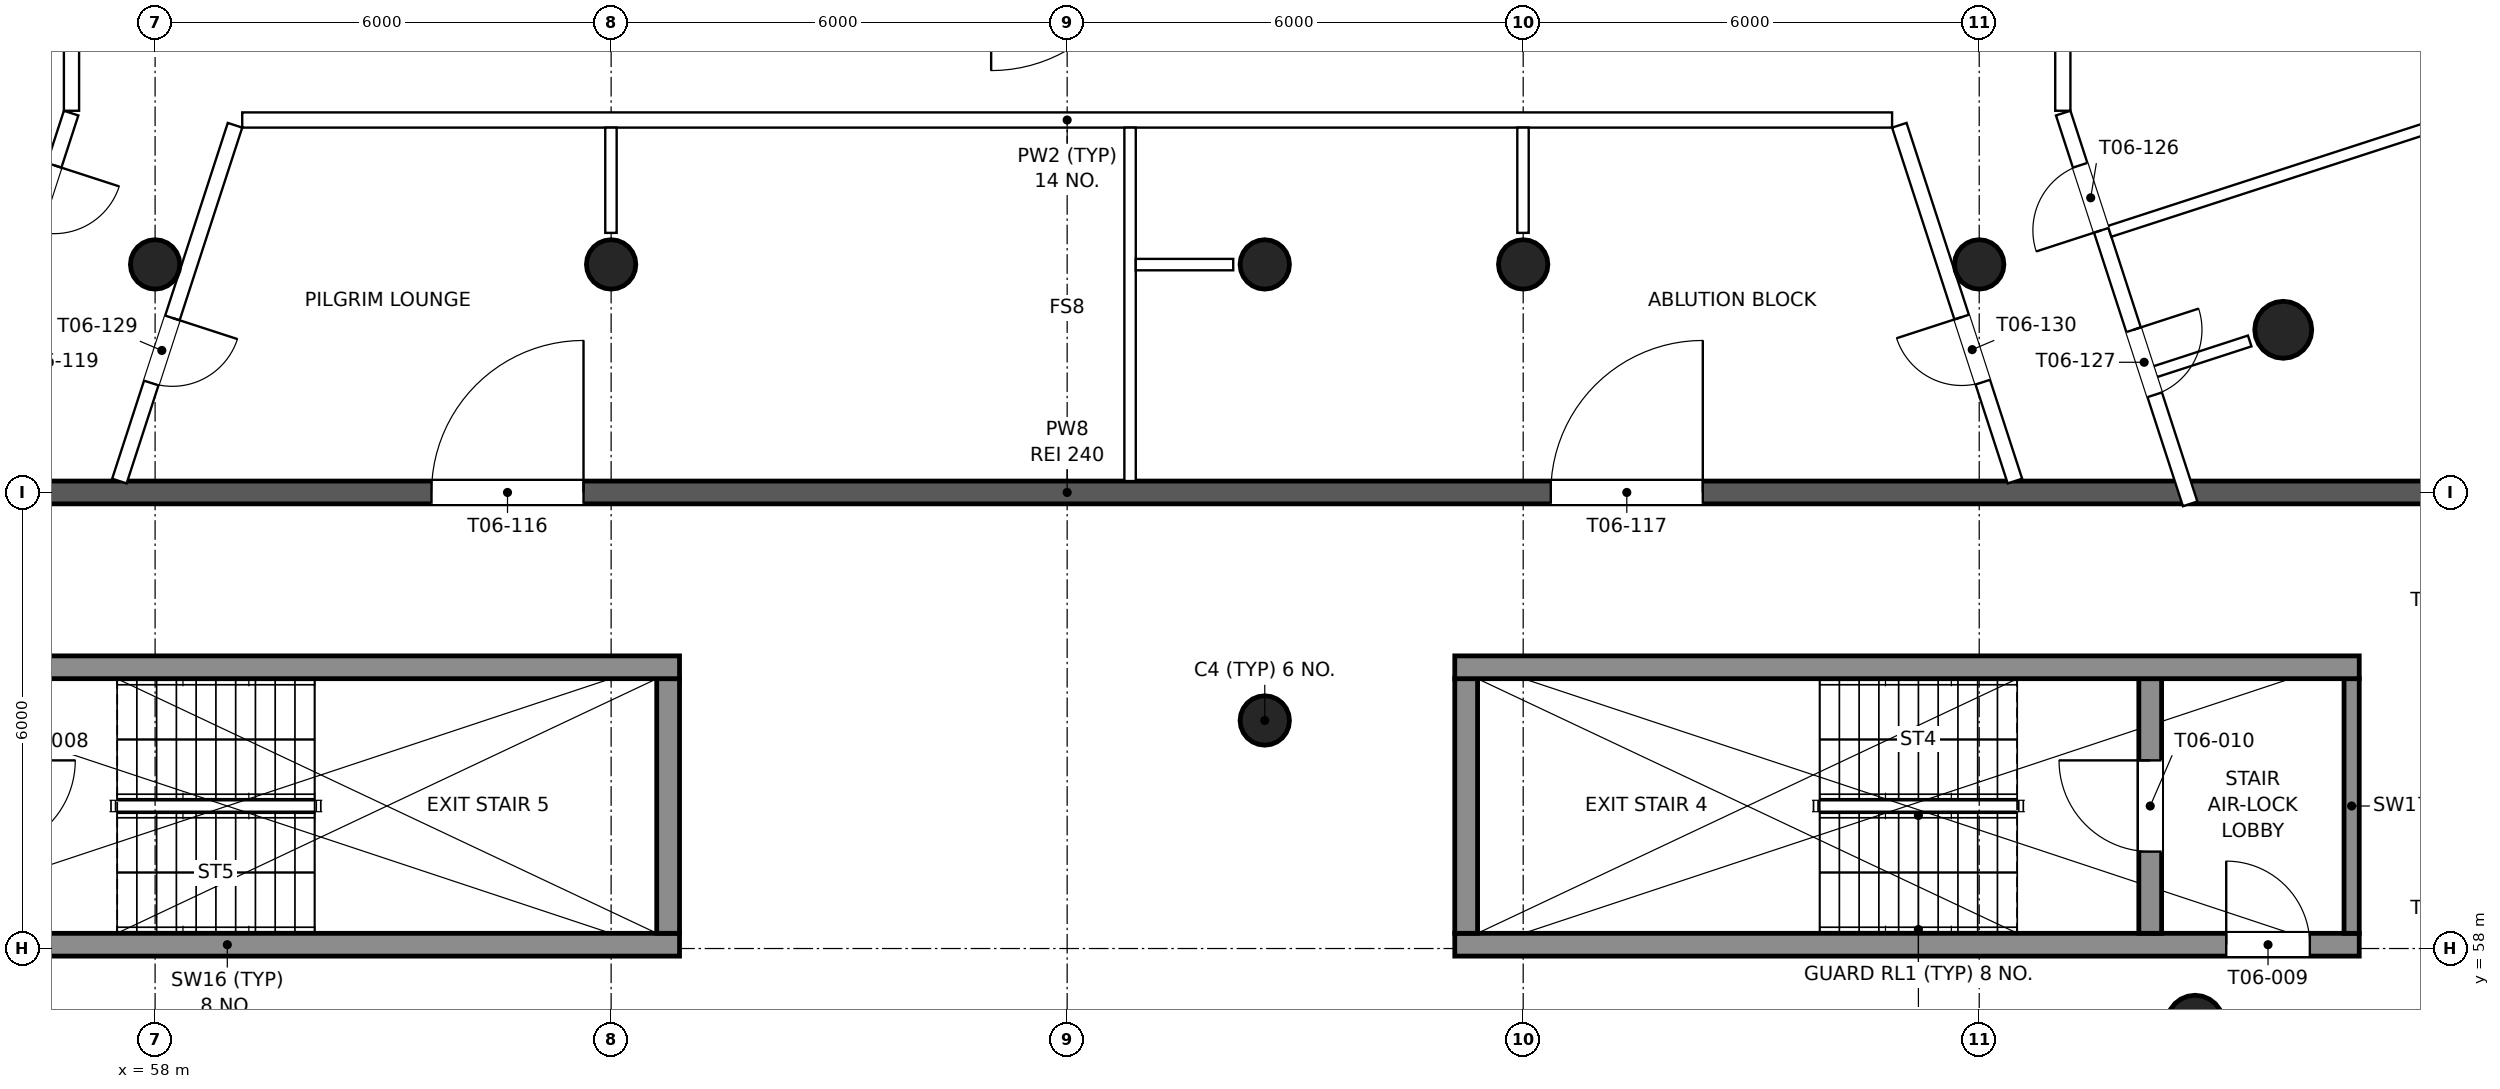
"""IFC4 building model, lengths in metres.
Left out: names, types, materials, properties, quantities, classifications, styles, units other than length and angle.
Written with IfcOpenShell. Run it as: python <this file> out.ifc"""

import sys

from ifc_helpers import new_model, si_unit, direction, frame, frame_2d, origin, origin_2d, place, context, subcontext, project, spatial, rectangle, circle, extrude, element, fill, save


model = new_model("IFC4")
c1 = context("Model", 3, precision=1e-05, world=origin(), true_north=direction((0.0, 1.0)))
c2 = subcontext(c1, "Body", "Model", "MODEL_VIEW")
j1 = project(units=[si_unit("LENGTHUNIT", "METRE"), si_unit("PLANEANGLEUNIT", "RADIAN")], contexts=[c1])
p1 = place(None, origin())
s1 = spatial("IfcSite", under=j1, at=p1, CompositionType="ELEMENT")
p2 = place(p1, origin())
s2 = spatial("IfcBuilding", under=s1, at=p2, CompositionType="ELEMENT")
p3 = place(p2, frame((0.0, 0.0, 98.6)))
s3 = spatial("IfcBuildingStorey", under=s2, at=p3, CompositionType="ELEMENT", Elevation=98.6)
for number, where, z_axis, x_axis in (
    (1, (84.84, 57.01, 0.0), (0.0, 0.0, 1.0), (1.0, 0.0, 0.0)),
    (2, (86.0, 66.14, 0.0), (0.0, 0.0, 1.0), (1.0, 0.0, 0.0)),
):
    element("IfcColumn", number, at=place(p3, frame(where, z_axis=z_axis, x_axis=x_axis)), inside=s3, PredefinedType="COLUMN", context=c2, shape_type="SweptSolid", body=[
        extrude(circle(Radius=0.375, at=origin_2d()), origin(), (0.0, 0.0, 1.0), 3.9),
    ])
for number, where, z_axis, x_axis in (
    (3, (58.0, 67.0, 0.0), (0.0, 0.0, 1.0), (1.0, 0.0, 0.0)),
    (4, (64.0, 67.0, 0.0), (0.0, 0.0, 1.0), (1.0, 0.0, 0.0)),
    (5, (72.6, 61.0, 0.0), (0.0, 0.0, 1.0), (1.0, 0.0, 0.0)),
    (6, (72.6, 67.0, 0.0), (0.0, 0.0, 1.0), (1.0, 0.0, 0.0)),
    (7, (76.0, 67.0, 0.0), (0.0, 0.0, 1.0), (1.0, 0.0, 0.0)),
    (8, (82.0, 67.0, 0.0), (0.0, 0.0, 1.0), (1.0, 0.0, 0.0)),
):
    element("IfcColumn", number, at=place(p3, frame(where, z_axis=z_axis, x_axis=x_axis)), inside=s3, PredefinedType="COLUMN", context=c2, shape_type="SweptSolid", body=[
        extrude(circle(Radius=0.325, at=origin_2d()), origin(), (0.0, 0.0, 1.0), 3.9),
    ])
p4 = place(p3, frame((53.0, 58.05, 0.0), z_axis=(0.0, 0.0, 1.0), x_axis=(1.0, 0.0, 0.0)))
e9 = element("IfcWall", 9, at=p4, inside=s3, PredefinedType="SHEAR", context=c2, shape_type="SweptSolid", body=[
    extrude(rectangle(XDim=11.9, YDim=0.3, at=frame_2d((5.95, 0.0))), origin(), (0.0, 0.0, 1.0), 3.9),
])
p5 = place(p4, frame((0.65, 0.0, 0.0)))
e10 = element("IfcOpeningElement", 10, at=p5, cuts=e9, PredefinedType="OPENING", context=c2, shape_type="SweptSolid", body=[
    extrude(rectangle(XDim=1.1, YDim=2.1, at=frame_2d((0.55, 1.05))), frame((0.0, 0.16, 0.0), z_axis=(0.0, -1.0, 0.0), x_axis=(1.0, 0.0, 0.0)), (0.0, 0.0, 1.0), 0.32),
])
p6 = place(p3, frame((75.1, 58.05, 0.0), z_axis=(0.0, 0.0, 1.0), x_axis=(1.0, 0.0, 0.0)))
e11 = element("IfcWall", 11, at=p6, inside=s3, PredefinedType="SHEAR", context=c2, shape_type="SweptSolid", body=[
    extrude(rectangle(XDim=11.9, YDim=0.3, at=frame_2d((5.95, 0.0))), origin(), (0.0, 0.0, 1.0), 3.9),
])
p7 = place(p6, frame((10.15, 0.0, 0.0)))
e12 = element("IfcOpeningElement", 12, at=p7, cuts=e11, PredefinedType="OPENING", context=c2, shape_type="SweptSolid", body=[
    extrude(rectangle(XDim=1.1, YDim=2.1, at=frame_2d((0.55, 1.05))), frame((0.0, 0.16, 0.0), z_axis=(0.0, -1.0, 0.0), x_axis=(1.0, 0.0, 0.0)), (0.0, 0.0, 1.0), 0.32),
])
for number, where, z_axis, x_axis in (
    (13, (64.75, 58.2, 0.0), (0.0, 0.0, 1.0), (0.0, 1.0, 0.0)),
    (14, (75.25, 58.2, 0.0), (0.0, 0.0, 1.0), (0.0, 1.0, 0.0)),
):
    element("IfcWall", number, at=place(p3, frame(where, z_axis=z_axis, x_axis=x_axis)), inside=s3, PredefinedType="SHEAR", context=c2, shape_type="SweptSolid", body=[
        extrude(rectangle(XDim=3.35, YDim=0.3, at=frame_2d((1.675, 0.0))), origin(), (0.0, 0.0, 1.0), 3.9),
    ])
p8 = place(p3, frame((84.25, 58.2, 0.0), z_axis=(0.0, 0.0, 1.0), x_axis=(0.0, 1.0, 0.0)))
e15 = element("IfcWall", 15, at=p8, inside=s3, PredefinedType="SHEAR", context=c2, shape_type="SweptSolid", body=[
    extrude(rectangle(XDim=3.35, YDim=0.3, at=frame_2d((1.675, 0.0))), origin(), (0.0, 0.0, 1.0), 3.9),
])
p9 = place(p8, frame((1.075, 0.0, 0.0)))
e16 = element("IfcOpeningElement", 16, at=p9, cuts=e15, PredefinedType="OPENING", context=c2, shape_type="SweptSolid", body=[
    extrude(rectangle(XDim=1.2, YDim=2.1, at=frame_2d((0.6, 1.05))), frame((0.0, 0.16, 0.0), z_axis=(0.0, -1.0, 0.0), x_axis=(1.0, 0.0, 0.0)), (0.0, 0.0, 1.0), 0.32),
])
p10 = place(p3, frame((86.9, 58.2, 0.0), z_axis=(0.0, 0.0, 1.0), x_axis=(0.0, 1.0, 0.0)))
e17 = element("IfcWall", 17, at=p10, inside=s3, PredefinedType="SHEAR", context=c2, shape_type="SweptSolid", body=[
    extrude(rectangle(XDim=3.35, YDim=0.2, at=frame_2d((1.675, 0.0))), origin(), (0.0, 0.0, 1.0), 3.9),
])
for number, where, z_axis, x_axis in (
    (18, (53.0, 61.7, 0.0), (0.0, 0.0, 1.0), (1.0, 0.0, 0.0)),
    (19, (75.1, 61.7, 0.0), (0.0, 0.0, 1.0), (1.0, 0.0, 0.0)),
):
    element("IfcWall", number, at=place(p3, frame(where, z_axis=z_axis, x_axis=x_axis)), inside=s3, PredefinedType="SHEAR", context=c2, shape_type="SweptSolid", body=[
        extrude(rectangle(XDim=11.9, YDim=0.3, at=frame_2d((5.95, 0.0))), origin(), (0.0, 0.0, 1.0), 3.9),
    ])
p11 = place(p3, frame((45.306, 64.0, 0.0), z_axis=(0.0, 0.0, 1.0), x_axis=(1.0, 0.0, 0.0)))
e20 = element("IfcWall", 20, at=p11, inside=s3, PredefinedType="PARTITIONING", context=c2, shape_type="SweptSolid", body=[
    extrude(rectangle(XDim=49.389, YDim=0.3, at=frame_2d((24.694, 0.0))), origin(), (0.0, 0.0, 1.0), 2.9),
])
p12 = place(p11, frame((16.331, 0.0, 0.0)))
e21 = element("IfcOpeningElement", 21, at=p12, cuts=e20, PredefinedType="OPENING", context=c2, shape_type="SweptSolid", body=[
    extrude(rectangle(XDim=2.0, YDim=2.1, at=frame_2d((1.0, 1.05))), frame((0.0, 0.16, 0.0), z_axis=(0.0, -1.0, 0.0), x_axis=(1.0, 0.0, 0.0)), (0.0, 0.0, 1.0), 0.32),
])
p13 = place(p11, frame((31.058, 0.0, 0.0)))
e22 = element("IfcOpeningElement", 22, at=p13, cuts=e20, PredefinedType="OPENING", context=c2, shape_type="SweptSolid", body=[
    extrude(rectangle(XDim=2.0, YDim=2.1, at=frame_2d((1.0, 1.05))), frame((0.0, 0.16, 0.0), z_axis=(0.0, -1.0, 0.0), x_axis=(1.0, 0.0, 0.0)), (0.0, 0.0, 1.0), 0.32),
])
p14 = place(p3, frame((55.225, 63.85, 0.0), z_axis=(0.0, 0.0, 1.0), x_axis=(0.309037048815, 0.951049999979, 0.0)))
e23 = element("IfcWall", 23, at=p14, inside=s3, PredefinedType="PARTITIONING", context=c2, shape_type="SweptSolid", body=[
    extrude(rectangle(XDim=5.405, YDim=0.2, at=frame_2d((2.703, 0.0))), origin(), (0.0, 0.0, 1.0), 3.6),
])
p15 = place(p14, frame((1.509, 0.0, 0.0)))
e24 = element("IfcOpeningElement", 24, at=p15, cuts=e23, PredefinedType="OPENING", context=c2, shape_type="SweptSolid", body=[
    extrude(rectangle(XDim=0.9, YDim=2.1, at=frame_2d((0.45, 1.05))), frame((0.0, 0.11, 0.0), z_axis=(0.0, -1.0, 0.0), x_axis=(1.0, 0.0, 0.0)), (0.0, 0.0, 1.0), 0.22),
])
p16 = place(p14, frame((3.784, 0.0, 0.0)))
e25 = element("IfcOpeningElement", 25, at=p16, cuts=e23, PredefinedType="OPENING", context=c2, shape_type="SweptSolid", body=[
    extrude(rectangle(XDim=0.9, YDim=2.1, at=frame_2d((0.45, 1.05))), frame((0.0, 0.11, 0.0), z_axis=(0.0, -1.0, 0.0), x_axis=(1.0, 0.0, 0.0)), (0.0, 0.0, 1.0), 0.22),
])
p17 = place(p3, frame((56.9, 69.022, 0.0), z_axis=(0.0, 0.0, 1.0), x_axis=(0.0, 1.0, 0.0)))
e26 = element("IfcWall", 26, at=p17, inside=s3, PredefinedType="PARTITIONING", context=c2, shape_type="SweptSolid", body=[
    extrude(rectangle(XDim=17.375, YDim=0.2, at=frame_2d((8.687, 0.0))), origin(), (0.0, 0.0, 1.0), 3.0),
])
p18 = place(p17, frame((4.894, 0.0, 0.0)))
e27 = element("IfcOpeningElement", 27, at=p18, cuts=e26, PredefinedType="OPENING", context=c2, shape_type="SweptSolid", body=[
    extrude(rectangle(XDim=0.9, YDim=2.1, at=frame_2d((0.45, 1.05))), frame((0.0, 0.11, 0.0), z_axis=(0.0, -1.0, 0.0), x_axis=(1.0, 0.0, 0.0)), (0.0, 0.0, 1.0), 0.22),
])
p19 = place(p17, frame((11.712, 0.0, 0.0)))
e28 = element("IfcOpeningElement", 28, at=p19, cuts=e26, PredefinedType="OPENING", context=c2, shape_type="SweptSolid", body=[
    extrude(rectangle(XDim=0.9, YDim=2.1, at=frame_2d((0.45, 1.05))), frame((0.0, 0.11, 0.0), z_axis=(0.0, -1.0, 0.0), x_axis=(1.0, 0.0, 0.0)), (0.0, 0.0, 1.0), 0.22),
])
p20 = place(p3, frame((83.1, 86.396, 0.0), z_axis=(0.0, 0.0, 1.0), x_axis=(0.0, -1.0, 0.0)))
e29 = element("IfcWall", 29, at=p20, inside=s3, PredefinedType="PARTITIONING", context=c2, shape_type="SweptSolid", body=[
    extrude(rectangle(XDim=17.375, YDim=0.2, at=frame_2d((8.687, 0.0))), origin(), (0.0, 0.0, 1.0), 3.0),
])
p21 = place(p20, frame((6.786, 0.0, 0.0)))
e30 = element("IfcOpeningElement", 30, at=p21, cuts=e29, PredefinedType="OPENING", context=c2, shape_type="SweptSolid", body=[
    extrude(rectangle(XDim=0.9, YDim=2.1, at=frame_2d((0.45, 1.05))), frame((0.0, 0.11, 0.0), z_axis=(0.0, -1.0, 0.0), x_axis=(1.0, 0.0, 0.0)), (0.0, 0.0, 1.0), 0.22),
])
p22 = place(p20, frame((8.156, 0.0, 0.0)))
e31 = element("IfcOpeningElement", 31, at=p22, cuts=e29, PredefinedType="OPENING", context=c2, shape_type="SweptSolid", body=[
    extrude(rectangle(XDim=0.9, YDim=2.1, at=frame_2d((0.45, 1.05))), frame((0.0, 0.11, 0.0), z_axis=(0.0, -1.0, 0.0), x_axis=(1.0, 0.0, 0.0)), (0.0, 0.0, 1.0), 0.22),
])
p23 = place(p20, frame((11.849, 0.0, 0.0)))
e32 = element("IfcOpeningElement", 32, at=p23, cuts=e29, PredefinedType="OPENING", context=c2, shape_type="SweptSolid", body=[
    extrude(rectangle(XDim=0.9, YDim=2.1, at=frame_2d((0.45, 1.05))), frame((0.0, 0.11, 0.0), z_axis=(0.0, -1.0, 0.0), x_axis=(1.0, 0.0, 0.0)), (0.0, 0.0, 1.0), 0.22),
])
p24 = place(p3, frame((83.105, 68.991, 0.0), z_axis=(0.0, 0.0, 1.0), x_axis=(0.309037048815, -0.951049999979, 0.0)))
e33 = element("IfcWall", 33, at=p24, inside=s3, PredefinedType="PARTITIONING", context=c2, shape_type="SweptSolid", body=[
    extrude(rectangle(XDim=5.405, YDim=0.2, at=frame_2d((2.703, 0.0))), origin(), (0.0, 0.0, 1.0), 3.6),
])
p25 = place(p24, frame((0.721, 0.0, 0.0)))
e34 = element("IfcOpeningElement", 34, at=p25, cuts=e33, PredefinedType="OPENING", context=c2, shape_type="SweptSolid", body=[
    extrude(rectangle(XDim=0.9, YDim=2.1, at=frame_2d((0.45, 1.05))), frame((0.0, 0.11, 0.0), z_axis=(0.0, -1.0, 0.0), x_axis=(1.0, 0.0, 0.0)), (0.0, 0.0, 1.0), 0.22),
])
p26 = place(p24, frame((2.997, 0.0, 0.0)))
e35 = element("IfcOpeningElement", 35, at=p26, cuts=e33, PredefinedType="OPENING", context=c2, shape_type="SweptSolid", body=[
    extrude(rectangle(XDim=0.9, YDim=2.1, at=frame_2d((0.45, 1.05))), frame((0.0, 0.11, 0.0), z_axis=(0.0, -1.0, 0.0), x_axis=(1.0, 0.0, 0.0)), (0.0, 0.0, 1.0), 0.22),
])
p27 = place(p3, frame((80.854, 68.9, 0.0), z_axis=(0.0, 0.0, 1.0), x_axis=(-1.0, 0.0, 0.0)))
e36 = element("IfcWall", 36, at=p27, inside=s3, PredefinedType="PARTITIONING", context=c2, shape_type="SweptSolid", body=[
    extrude(rectangle(XDim=21.708, YDim=0.2, at=frame_2d((10.854, 0.0))), origin(), (0.0, 0.0, 1.0), 3.6),
])
p28 = place(p3, frame((59.051, 68.831, 0.0), z_axis=(0.0, 0.0, 1.0), x_axis=(-0.309031112369, -0.951051928965, 0.0)))
e37 = element("IfcWall", 37, at=p28, inside=s3, PredefinedType="PARTITIONING", context=c2, shape_type="SweptSolid", body=[
    extrude(rectangle(XDim=4.922, YDim=0.2, at=frame_2d((2.461, 0.0))), origin(), (0.0, 0.0, 1.0), 3.6),
])
p29 = place(p28, frame((2.665, 0.0, 0.0)))
e38 = element("IfcOpeningElement", 38, at=p29, cuts=e37, PredefinedType="OPENING", context=c2, shape_type="SweptSolid", body=[
    extrude(rectangle(XDim=0.9, YDim=2.1, at=frame_2d((0.45, 1.05))), frame((0.0, 0.11, 0.0), z_axis=(0.0, -1.0, 0.0), x_axis=(1.0, 0.0, 0.0)), (0.0, 0.0, 1.0), 0.22),
])
p30 = place(p3, frame((82.47, 64.15, 0.0), z_axis=(0.0, 0.0, 1.0), x_axis=(-0.309031112369, 0.951051928965, 0.0)))
e39 = element("IfcWall", 39, at=p30, inside=s3, PredefinedType="PARTITIONING", context=c2, shape_type="SweptSolid", body=[
    extrude(rectangle(XDim=4.922, YDim=0.2, at=frame_2d((2.461, 0.0))), origin(), (0.0, 0.0, 1.0), 3.6),
])
p31 = place(p30, frame((1.368, 0.0, 0.0)))
e40 = element("IfcOpeningElement", 40, at=p31, cuts=e39, PredefinedType="OPENING", context=c2, shape_type="SweptSolid", body=[
    extrude(rectangle(XDim=0.9, YDim=2.1, at=frame_2d((0.45, 1.05))), frame((0.0, 0.11, 0.0), z_axis=(0.0, -1.0, 0.0), x_axis=(1.0, 0.0, 0.0)), (0.0, 0.0, 1.0), 0.22),
])
p32 = place(p3, frame((92.636, 70.334, 0.0), z_axis=(0.0, 0.0, 1.0), x_axis=(-0.951060843481, -0.309003676349, 0.0)))
e41 = element("IfcWall", 41, at=p32, inside=s3, PredefinedType="PARTITIONING", context=c2, shape_type="SweptSolid", body=[
    extrude(rectangle(XDim=9.38, YDim=0.15, at=frame_2d((4.69, 0.0))), origin(), (0.0, 0.0, 1.0), 3.0),
])
p33 = place(p3, frame((70.828, 64.15, 0.0), z_axis=(0.0, 0.0, 1.0), x_axis=(0.0, 1.0, 0.0)))
e42 = element("IfcWall", 42, at=p33, inside=s3, PredefinedType="PARTITIONING", context=c2, shape_type="SweptSolid", body=[
    extrude(rectangle(XDim=4.65, YDim=0.15, at=frame_2d((2.325, 0.0))), origin(), (0.0, 0.0, 1.0), 3.6),
])
p34 = place(p3, frame((85.559, 65.993, 0.0), z_axis=(0.0, 0.0, 1.0), x_axis=(-0.951046418515, -0.309048070419, 0.0)))
e43 = element("IfcWall", 43, at=p34, inside=s3, PredefinedType="PARTITIONING", context=c2, shape_type="SweptSolid", body=[
    extrude(rectangle(XDim=1.307, YDim=0.15, at=frame_2d((0.654, 0.0))), origin(), (0.0, 0.0, 1.0), 3.6),
])
p35 = place(p3, frame((63.998, 67.415, 0.0), z_axis=(0.0, 0.0, 1.0), x_axis=(0.0, 1.0, 0.0)))
e44 = element("IfcWall", 44, at=p35, inside=s3, PredefinedType="PARTITIONING", context=c2, shape_type="SweptSolid", body=[
    extrude(rectangle(XDim=1.385, YDim=0.15, at=frame_2d((0.692, 0.0))), origin(), (0.0, 0.0, 1.0), 3.6),
])
p36 = place(p3, frame((72.185, 66.998, 0.0), z_axis=(0.0, 0.0, 1.0), x_axis=(-1.0, 0.0, 0.0)))
e45 = element("IfcWall", 45, at=p36, inside=s3, PredefinedType="PARTITIONING", context=c2, shape_type="SweptSolid", body=[
    extrude(rectangle(XDim=1.282, YDim=0.15, at=frame_2d((0.641, 0.0))), origin(), (0.0, 0.0, 1.0), 3.6),
])
p37 = place(p3, frame((75.998, 67.415, 0.0), z_axis=(0.0, 0.0, 1.0), x_axis=(0.0, 1.0, 0.0)))
e46 = element("IfcWall", 46, at=p37, inside=s3, PredefinedType="PARTITIONING", context=c2, shape_type="SweptSolid", body=[
    extrude(rectangle(XDim=1.385, YDim=0.15, at=frame_2d((0.692, 0.0))), origin(), (0.0, 0.0, 1.0), 3.6),
])
p38 = place(p7, origin())
e47 = element("IfcDoor", 47, at=p38, inside=s3, OperationType="SINGLE_SWING_LEFT", PredefinedType="DOOR", context=c2, shape_type="SweptSolid", body=[
    extrude(rectangle(XDim=1.1, YDim=2.1, at=frame_2d((0.55, 1.05))), frame((0.0, 0.025, 0.0), z_axis=(0.0, -1.0, 0.0), x_axis=(1.0, 0.0, 0.0)), (0.0, 0.0, 1.0), 0.05),
])
fill(e12, e47)
p39 = place(p9, origin())
e48 = element("IfcDoor", 48, at=p39, inside=s3, OperationType="SINGLE_SWING_RIGHT", PredefinedType="DOOR", context=c2, shape_type="SweptSolid", body=[
    extrude(rectangle(XDim=1.2, YDim=2.1, at=frame_2d((0.6, 1.05))), frame((0.0, 0.025, 0.0), z_axis=(0.0, -1.0, 0.0), x_axis=(1.0, 0.0, 0.0)), (0.0, 0.0, 1.0), 0.05),
])
fill(e16, e48)
p40 = place(p12, origin())
e49 = element("IfcDoor", 49, at=p40, inside=s3, OperationType="DOUBLE_DOOR_SINGLE_SWING", PredefinedType="DOOR", context=c2, shape_type="SweptSolid", body=[
    extrude(rectangle(XDim=2.0, YDim=2.1, at=frame_2d((1.0, 1.05))), frame((0.0, 0.025, 0.0), z_axis=(0.0, -1.0, 0.0), x_axis=(1.0, 0.0, 0.0)), (0.0, 0.0, 1.0), 0.05),
])
fill(e21, e49)
p41 = place(p13, origin())
e50 = element("IfcDoor", 50, at=p41, inside=s3, OperationType="DOUBLE_DOOR_SINGLE_SWING", PredefinedType="DOOR", context=c2, shape_type="SweptSolid", body=[
    extrude(rectangle(XDim=2.0, YDim=2.1, at=frame_2d((1.0, 1.05))), frame((0.0, 0.025, 0.0), z_axis=(0.0, -1.0, 0.0), x_axis=(1.0, 0.0, 0.0)), (0.0, 0.0, 1.0), 0.05),
])
fill(e22, e50)
p42 = place(p16, frame((0.9, 0.0, 0.0), z_axis=(0.0, 0.0, 1.0), x_axis=(-1.0, 0.0, 0.0)))
e51 = element("IfcDoor", 51, at=p42, inside=s3, OperationType="SINGLE_SWING_LEFT", PredefinedType="DOOR", context=c2, shape_type="SweptSolid", body=[
    extrude(rectangle(XDim=0.9, YDim=2.1, at=frame_2d((0.45, 1.05))), frame((0.0, 0.025, 0.0), z_axis=(0.0, -1.0, 0.0), x_axis=(1.0, 0.0, 0.0)), (0.0, 0.0, 1.0), 0.05),
])
fill(e25, e51)
p43 = place(p25, frame((0.9, 0.0, 0.0), z_axis=(0.0, 0.0, 1.0), x_axis=(-1.0, 0.0, 0.0)))
e52 = element("IfcDoor", 52, at=p43, inside=s3, OperationType="SINGLE_SWING_LEFT", PredefinedType="DOOR", context=c2, shape_type="SweptSolid", body=[
    extrude(rectangle(XDim=0.9, YDim=2.1, at=frame_2d((0.45, 1.05))), frame((0.0, 0.025, 0.0), z_axis=(0.0, -1.0, 0.0), x_axis=(1.0, 0.0, 0.0)), (0.0, 0.0, 1.0), 0.05),
])
fill(e34, e52)
p44 = place(p26, origin())
e53 = element("IfcDoor", 53, at=p44, inside=s3, OperationType="SINGLE_SWING_LEFT", PredefinedType="DOOR", context=c2, shape_type="SweptSolid", body=[
    extrude(rectangle(XDim=0.9, YDim=2.1, at=frame_2d((0.45, 1.05))), frame((0.0, 0.025, 0.0), z_axis=(0.0, -1.0, 0.0), x_axis=(1.0, 0.0, 0.0)), (0.0, 0.0, 1.0), 0.05),
])
fill(e35, e53)
p45 = place(p29, origin())
e54 = element("IfcDoor", 54, at=p45, inside=s3, OperationType="SINGLE_SWING_LEFT", PredefinedType="DOOR", context=c2, shape_type="SweptSolid", body=[
    extrude(rectangle(XDim=0.9, YDim=2.1, at=frame_2d((0.45, 1.05))), frame((0.0, 0.025, 0.0), z_axis=(0.0, -1.0, 0.0), x_axis=(1.0, 0.0, 0.0)), (0.0, 0.0, 1.0), 0.05),
])
fill(e38, e54)
p46 = place(p31, origin())
e55 = element("IfcDoor", 55, at=p46, inside=s3, OperationType="SINGLE_SWING_RIGHT", PredefinedType="DOOR", context=c2, shape_type="SweptSolid", body=[
    extrude(rectangle(XDim=0.9, YDim=2.1, at=frame_2d((0.45, 1.05))), frame((0.0, 0.025, 0.0), z_axis=(0.0, -1.0, 0.0), x_axis=(1.0, 0.0, 0.0)), (0.0, 0.0, 1.0), 0.05),
])
fill(e40, e55)
save(model, sys.argv[1])
